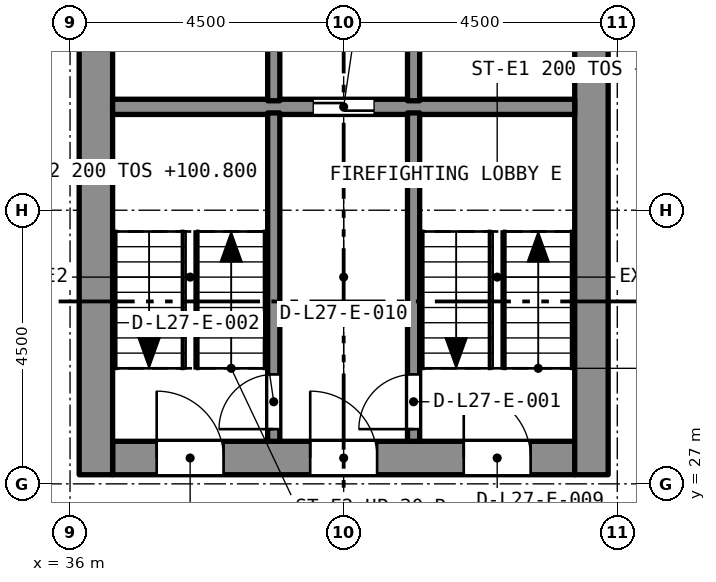
"""IFC4 building model, lengths in metres.
Left out: names, types, materials, properties, quantities, classifications, styles, units other than length and angle.
Written with IfcOpenShell. Run it as: python <this file> out.ifc"""

import sys

from ifc_helpers import new_model, si_unit, direction, frame, frame_2d, origin, place, context, subcontext, project, spatial, rectangle, extrude, element, fill, save


model = new_model("IFC4")
c1 = context("Model", 3, precision=1e-05, world=origin(), true_north=direction((0.0, 1.0)))
c2 = subcontext(c1, "Body", "Model", "MODEL_VIEW")
j1 = project(units=[si_unit("LENGTHUNIT", "METRE"), si_unit("PLANEANGLEUNIT", "RADIAN")], contexts=[c1])
p1 = place(None, origin())
s1 = spatial("IfcSite", under=j1, at=p1, CompositionType="ELEMENT")
p2 = place(p1, origin())
s2 = spatial("IfcBuilding", under=s1, at=p2, CompositionType="ELEMENT")
p3 = place(p2, frame((0.0, 0.0, 99.2)))
s3 = spatial("IfcBuildingStorey", under=s2, at=p3, CompositionType="ELEMENT", Elevation=99.2)
p4 = place(p3, frame((36.7, 27.425, 0.0), z_axis=(0.0, 0.0, 1.0), x_axis=(1.0, 0.0, 0.0)))
e1 = element("IfcWall", 1, at=p4, inside=s3, PredefinedType="SOLIDWALL", context=c2, shape_type="SweptSolid", body=[
    extrude(rectangle(XDim=7.6, YDim=0.55, at=frame_2d((3.8, 0.0))), origin(), (0.0, 0.0, 1.0), 3.2),
])
p5 = place(p4, frame((5.775, 0.0, 0.0)))
e2 = element("IfcOpeningElement", 2, at=p5, cuts=e1, PredefinedType="OPENING", context=c2, shape_type="SweptSolid", body=[
    extrude(rectangle(XDim=1.1, YDim=2.1, at=frame_2d((0.55, 1.05))), frame((0.0, 0.285, 0.0), z_axis=(0.0, -1.0, 0.0), x_axis=(1.0, 0.0, 0.0)), (0.0, 0.0, 1.0), 0.57),
])
p6 = place(p4, frame((3.25, 0.0, 0.0)))
e3 = element("IfcOpeningElement", 3, at=p6, cuts=e1, PredefinedType="OPENING", context=c2, shape_type="SweptSolid", body=[
    extrude(rectangle(XDim=1.1, YDim=2.1, at=frame_2d((0.55, 1.05))), frame((0.0, 0.285, 0.0), z_axis=(0.0, -1.0, 0.0), x_axis=(1.0, 0.0, 0.0)), (0.0, 0.0, 1.0), 0.57),
])
p7 = place(p4, frame((0.725, 0.0, 0.0)))
e4 = element("IfcOpeningElement", 4, at=p7, cuts=e1, PredefinedType="OPENING", context=c2, shape_type="SweptSolid", body=[
    extrude(rectangle(XDim=1.1, YDim=2.1, at=frame_2d((0.55, 1.05))), frame((0.0, 0.285, 0.0), z_axis=(0.0, -1.0, 0.0), x_axis=(1.0, 0.0, 0.0)), (0.0, 0.0, 1.0), 0.57),
])
p8 = place(p3, frame((36.425, 27.15, 0.0), z_axis=(0.0, 0.0, 1.0), x_axis=(0.0, 1.0, 0.0)))
e5 = element("IfcWall", 5, at=p8, inside=s3, PredefinedType="SOLIDWALL", context=c2, shape_type="SweptSolid", body=[
    extrude(rectangle(XDim=13.2, YDim=0.55, at=frame_2d((6.6, 0.0))), origin(), (0.0, 0.0, 1.0), 3.2),
])
p9 = place(p8, frame((8.8, 0.0, 0.0)))
e6 = element("IfcOpeningElement", 6, at=p9, cuts=e5, PredefinedType="OPENING", context=c2, shape_type="SweptSolid", body=[
    extrude(rectangle(XDim=1.2, YDim=2.1, at=frame_2d((0.6, 1.05))), frame((0.0, 0.285, 0.0), z_axis=(0.0, -1.0, 0.0), x_axis=(1.0, 0.0, 0.0)), (0.0, 0.0, 1.0), 0.57),
])
p10 = place(p3, frame((44.575, 27.15, 0.0), z_axis=(0.0, 0.0, 1.0), x_axis=(0.0, 1.0, 0.0)))
e7 = element("IfcWall", 7, at=p10, inside=s3, PredefinedType="SOLIDWALL", context=c2, shape_type="SweptSolid", body=[
    extrude(rectangle(XDim=13.2, YDim=0.55, at=frame_2d((6.6, 0.0))), origin(), (0.0, 0.0, 1.0), 3.2),
])
p11 = place(p10, frame((8.8, 0.0, 0.0)))
e8 = element("IfcOpeningElement", 8, at=p11, cuts=e7, PredefinedType="OPENING", context=c2, shape_type="SweptSolid", body=[
    extrude(rectangle(XDim=1.2, YDim=2.1, at=frame_2d((0.6, 1.05))), frame((0.0, 0.285, 0.0), z_axis=(0.0, -1.0, 0.0), x_axis=(1.0, 0.0, 0.0)), (0.0, 0.0, 1.0), 0.57),
])
p12 = place(p3, frame((36.7, 33.2, 0.0), z_axis=(0.0, 0.0, 1.0), x_axis=(1.0, 0.0, 0.0)))
e9 = element("IfcWall", 9, at=p12, inside=s3, PredefinedType="SOLIDWALL", context=c2, shape_type="SweptSolid", body=[
    extrude(rectangle(XDim=7.6, YDim=0.25, at=frame_2d((3.8, 0.0))), origin(), (0.0, 0.0, 1.0), 2.9),
])
p13 = place(p12, frame((3.3, 0.0, 0.0)))
e10 = element("IfcOpeningElement", 10, at=p13, cuts=e9, PredefinedType="OPENING", context=c2, shape_type="SweptSolid", body=[
    extrude(rectangle(XDim=1.0, YDim=2.1, at=frame_2d((0.5, 1.05))), frame((0.0, 0.135, 0.0), z_axis=(0.0, -1.0, 0.0), x_axis=(1.0, 0.0, 0.0)), (0.0, 0.0, 1.0), 0.27),
])
p14 = place(p3, frame((41.65, 27.7, 0.0), z_axis=(0.0, 0.0, 1.0), x_axis=(0.0, 1.0, 0.0)))
e11 = element("IfcWall", 11, at=p14, inside=s3, PredefinedType="SOLIDWALL", context=c2, shape_type="SweptSolid", body=[
    extrude(rectangle(XDim=5.4, YDim=0.2, at=frame_2d((2.7, 0.0))), origin(), (0.0, 0.0, 1.0), 2.9),
])
p15 = place(p14, frame((0.2, 0.0, 0.0)))
e12 = element("IfcOpeningElement", 12, at=p15, cuts=e11, PredefinedType="OPENING", context=c2, shape_type="SweptSolid", body=[
    extrude(rectangle(XDim=0.9, YDim=2.1, at=frame_2d((0.45, 1.05))), frame((0.0, 0.11, 0.0), z_axis=(0.0, -1.0, 0.0), x_axis=(1.0, 0.0, 0.0)), (0.0, 0.0, 1.0), 0.22),
])
p16 = place(p3, frame((39.35, 27.7, 0.0), z_axis=(0.0, 0.0, 1.0), x_axis=(0.0, 1.0, 0.0)))
e13 = element("IfcWall", 13, at=p16, inside=s3, PredefinedType="SOLIDWALL", context=c2, shape_type="SweptSolid", body=[
    extrude(rectangle(XDim=5.4, YDim=0.2, at=frame_2d((2.7, 0.0))), origin(), (0.0, 0.0, 1.0), 2.9),
])
p17 = place(p16, frame((0.2, 0.0, 0.0)))
e14 = element("IfcOpeningElement", 14, at=p17, cuts=e13, PredefinedType="OPENING", context=c2, shape_type="SweptSolid", body=[
    extrude(rectangle(XDim=0.9, YDim=2.1, at=frame_2d((0.45, 1.05))), frame((0.0, 0.11, 0.0), z_axis=(0.0, -1.0, 0.0), x_axis=(1.0, 0.0, 0.0)), (0.0, 0.0, 1.0), 0.22),
])
for number, where, z_axis, x_axis in (
    (15, (41.65, 33.3, 0.0), (0.0, 0.0, 1.0), (0.0, 1.0, 0.0)),
    (16, (39.35, 33.3, 0.0), (0.0, 0.0, 1.0), (0.0, 1.0, 0.0)),
):
    element("IfcWall", number, at=place(p3, frame(where, z_axis=z_axis, x_axis=x_axis)), inside=s3, PredefinedType="SOLIDWALL", context=c2, shape_type="SweptSolid", body=[
        extrude(rectangle(XDim=2.3, YDim=0.2, at=frame_2d((1.15, 0.0))), origin(), (0.0, 0.0, 1.0), 2.9),
    ])
p18 = place(p15, origin())
e17 = element("IfcDoor", 17, at=p18, inside=s3, OperationType="SINGLE_SWING_LEFT", PredefinedType="DOOR", context=c2, shape_type="SweptSolid", body=[
    extrude(rectangle(XDim=0.9, YDim=2.1, at=frame_2d((0.45, 1.05))), frame((0.0, 0.025, 0.0), z_axis=(0.0, -1.0, 0.0), x_axis=(1.0, 0.0, 0.0)), (0.0, 0.0, 1.0), 0.05),
])
fill(e12, e17)
p19 = place(p17, origin())
e18 = element("IfcDoor", 18, at=p19, inside=s3, OperationType="SINGLE_SWING_LEFT", PredefinedType="DOOR", context=c2, shape_type="SweptSolid", body=[
    extrude(rectangle(XDim=0.9, YDim=2.1, at=frame_2d((0.45, 1.05))), frame((0.0, 0.025, 0.0), z_axis=(0.0, -1.0, 0.0), x_axis=(1.0, 0.0, 0.0)), (0.0, 0.0, 1.0), 0.05),
])
fill(e14, e18)
p20 = place(p13, origin())
e19 = element("IfcDoor", 19, at=p20, inside=s3, OperationType="SLIDING_TO_LEFT", PredefinedType="DOOR", context=c2, shape_type="SweptSolid", body=[
    extrude(rectangle(XDim=1.0, YDim=2.1, at=frame_2d((0.5, 1.05))), frame((0.0, 0.025, 0.0), z_axis=(0.0, -1.0, 0.0), x_axis=(1.0, 0.0, 0.0)), (0.0, 0.0, 1.0), 0.05),
])
fill(e10, e19)
p21 = place(p5, origin())
e20 = element("IfcDoor", 20, at=p21, inside=s3, OperationType="SINGLE_SWING_LEFT", PredefinedType="DOOR", context=c2, shape_type="SweptSolid", body=[
    extrude(rectangle(XDim=1.1, YDim=2.1, at=frame_2d((0.55, 1.05))), frame((0.0, 0.025, 0.0), z_axis=(0.0, -1.0, 0.0), x_axis=(1.0, 0.0, 0.0)), (0.0, 0.0, 1.0), 0.05),
])
fill(e2, e20)
p22 = place(p6, origin())
e21 = element("IfcDoor", 21, at=p22, inside=s3, OperationType="SINGLE_SWING_LEFT", PredefinedType="DOOR", context=c2, shape_type="SweptSolid", body=[
    extrude(rectangle(XDim=1.1, YDim=2.1, at=frame_2d((0.55, 1.05))), frame((0.0, 0.025, 0.0), z_axis=(0.0, -1.0, 0.0), x_axis=(1.0, 0.0, 0.0)), (0.0, 0.0, 1.0), 0.05),
])
fill(e3, e21)
p23 = place(p7, origin())
e22 = element("IfcDoor", 22, at=p23, inside=s3, OperationType="SINGLE_SWING_LEFT", PredefinedType="DOOR", context=c2, shape_type="SweptSolid", body=[
    extrude(rectangle(XDim=1.1, YDim=2.1, at=frame_2d((0.55, 1.05))), frame((0.0, 0.025, 0.0), z_axis=(0.0, -1.0, 0.0), x_axis=(1.0, 0.0, 0.0)), (0.0, 0.0, 1.0), 0.05),
])
fill(e4, e22)
save(model, sys.argv[1])
